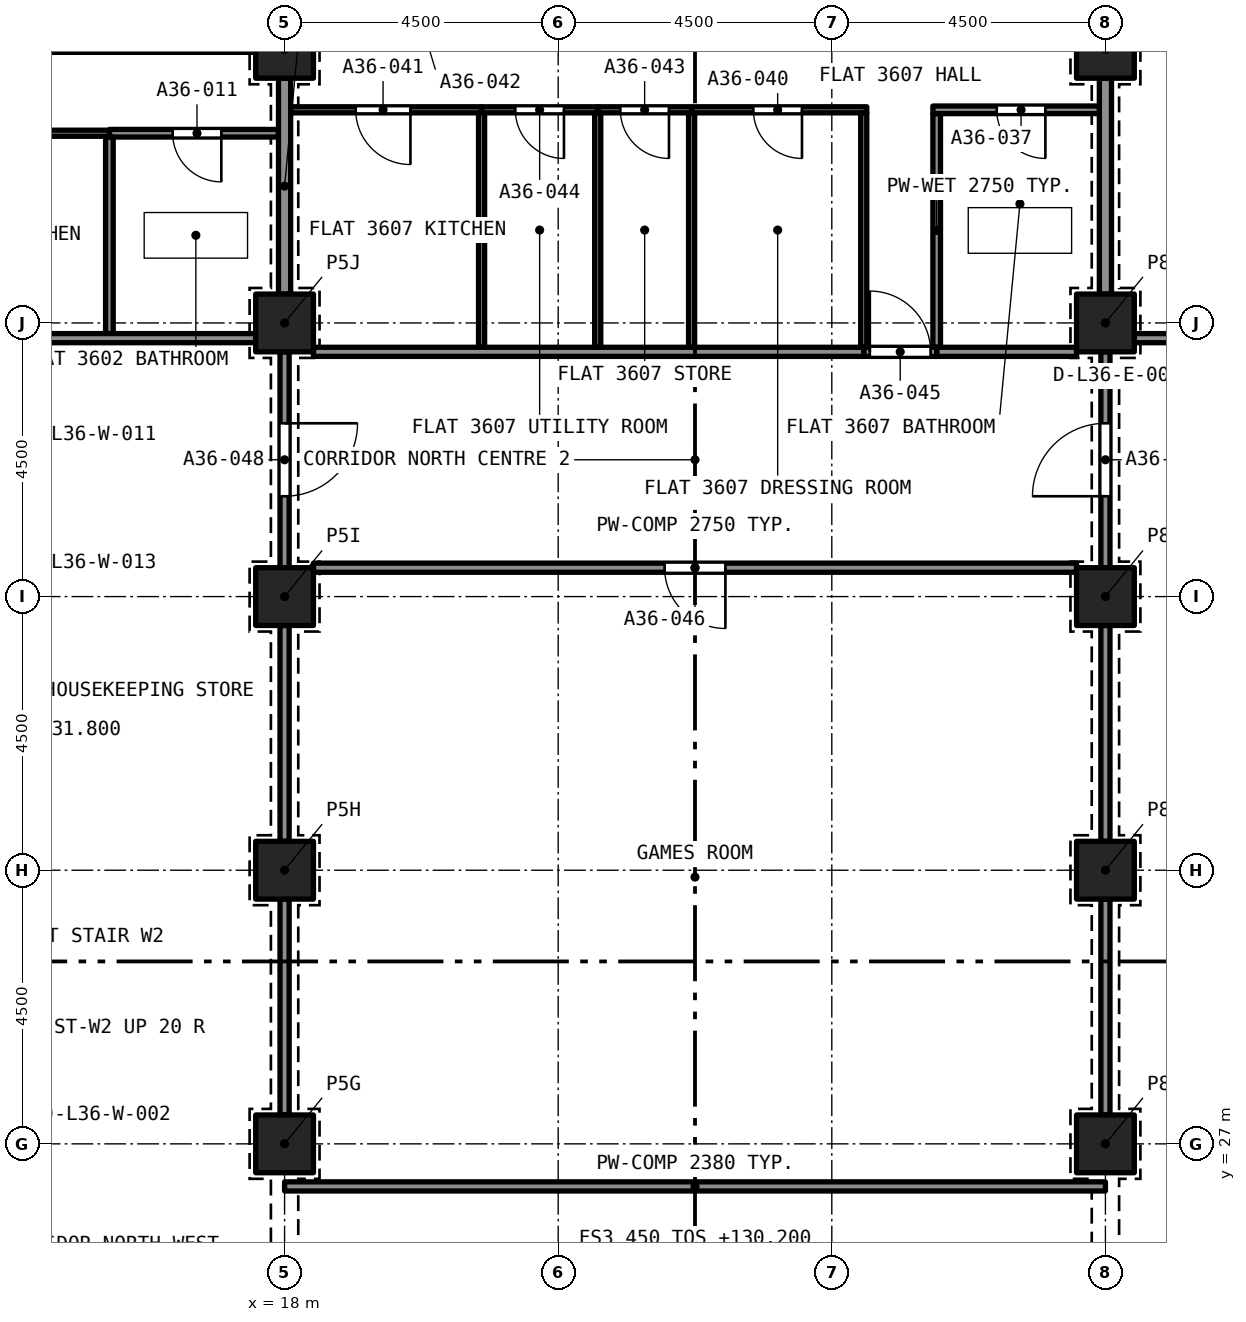
"""IFC4 building model, lengths in metres.
Left out: names, types, materials, properties, quantities, classifications, styles, units other than length and angle.
Written with IfcOpenShell. Run it as: python <this file> out.ifc"""

import sys

from ifc_helpers import new_model, si_unit, direction, frame, frame_2d, origin, origin_2d, place, context, subcontext, project, spatial, rectangle, extrude, element, fill, save


model = new_model("IFC4")
c1 = context("Model", 3, precision=1e-05, world=origin(), true_north=direction((0.0, 1.0)))
c2 = subcontext(c1, "Body", "Model", "MODEL_VIEW")
j1 = project(units=[si_unit("LENGTHUNIT", "METRE"), si_unit("PLANEANGLEUNIT", "RADIAN")], contexts=[c1])
p1 = place(None, origin())
s1 = spatial("IfcSite", under=j1, at=p1, CompositionType="ELEMENT")
p2 = place(p1, origin())
s2 = spatial("IfcBuilding", under=s1, at=p2, CompositionType="ELEMENT")
p3 = place(p2, frame((0.0, 0.0, 130.2)))
s3 = spatial("IfcBuildingStorey", under=s2, at=p3, CompositionType="ELEMENT", Elevation=130.2)
for number, where, z_axis, x_axis in (
    (1, (18.0, 27.0, 0.0), (0.0, 0.0, 1.0), (1.0, 0.0, 0.0)),
    (2, (31.5, 27.0, 0.0), (0.0, 0.0, 1.0), (1.0, 0.0, 0.0)),
    (3, (18.0, 31.5, 0.0), (0.0, 0.0, 1.0), (1.0, 0.0, 0.0)),
    (4, (31.5, 31.5, 0.0), (0.0, 0.0, 1.0), (1.0, 0.0, 0.0)),
    (5, (18.0, 36.0, 0.0), (0.0, 0.0, 1.0), (1.0, 0.0, 0.0)),
    (6, (31.5, 36.0, 0.0), (0.0, 0.0, 1.0), (1.0, 0.0, 0.0)),
    (7, (18.0, 40.5, 0.0), (0.0, 0.0, 1.0), (1.0, 0.0, 0.0)),
    (8, (31.5, 40.5, 0.0), (0.0, 0.0, 1.0), (1.0, 0.0, 0.0)),
    (9, (18.0, 45.0, 0.0), (0.0, 0.0, 1.0), (1.0, 0.0, 0.0)),
    (10, (31.5, 45.0, 0.0), (0.0, 0.0, 1.0), (1.0, 0.0, 0.0)),
):
    element("IfcColumn", number, at=place(p3, frame(where, z_axis=z_axis, x_axis=x_axis)), inside=s3, PredefinedType="COLUMN", context=c2, shape_type="SweptSolid", body=[
        extrude(rectangle(XDim=0.95, YDim=0.95, at=origin_2d()), origin(), (0.0, 0.0, 1.0), 3.2),
    ])
p4 = place(p3, frame((17.9, 43.62, 0.0), z_axis=(0.0, 0.0, 1.0), x_axis=(-1.0, 0.0, 0.0)))
e11 = element("IfcWall", 11, at=p4, inside=s3, PredefinedType="PARTITIONING", context=c2, shape_type="SweptSolid", body=[
    extrude(rectangle(XDim=2.781, YDim=0.125, at=frame_2d((1.39, 0.0))), origin(), (0.0, 0.0, 1.0), 2.9),
])
p5 = place(p4, frame((0.94, 0.0, 0.0)))
e12 = element("IfcOpeningElement", 12, at=p5, cuts=e11, PredefinedType="OPENING", context=c2, shape_type="SweptSolid", body=[
    extrude(rectangle(XDim=0.8, YDim=2.1, at=frame_2d((0.4, 1.05))), frame((0.0, 0.073, 0.0), z_axis=(0.0, -1.0, 0.0), x_axis=(1.0, 0.0, 0.0)), (0.0, 0.0, 1.0), 0.145),
])
p6 = place(p3, frame((15.119, 40.325, 0.0), z_axis=(0.0, 0.0, 1.0), x_axis=(0.0, 1.0, 0.0)))
e13 = element("IfcWall", 13, at=p6, inside=s3, PredefinedType="PARTITIONING", context=c2, shape_type="SweptSolid", body=[
    extrude(rectangle(XDim=3.233, YDim=0.125, at=frame_2d((1.616, 0.0))), origin(), (0.0, 0.0, 1.0), 2.9),
])
p7 = place(p3, frame((18.0, 40.975, 0.0), z_axis=(0.0, 0.0, 1.0), x_axis=(0.0, 1.0, 0.0)))
e14 = element("IfcWall", 14, at=p7, inside=s3, PredefinedType="PARTITIONING", context=c2, shape_type="SweptSolid", body=[
    extrude(rectangle(XDim=3.55, YDim=0.2, at=frame_2d((1.775, 0.0))), origin(), (0.0, 0.0, 1.0), 2.38),
])
p8 = place(p3, frame((13.5, 45.0, 0.0), z_axis=(0.0, 0.0, 1.0), x_axis=(1.0, 0.0, 0.0)))
e15 = element("IfcWall", 15, at=p8, inside=s3, PredefinedType="PARTITIONING", context=c2, shape_type="SweptSolid", body=[
    extrude(rectangle(XDim=4.025, YDim=0.1, at=frame_2d((2.012, 0.0))), origin(), (0.0, 0.0, 1.0), 2.9),
])
p9 = place(p8, frame((1.8, 0.0, 0.0)))
e16 = element("IfcOpeningElement", 16, at=p9, cuts=e15, PredefinedType="OPENING", context=c2, shape_type="SweptSolid", body=[
    extrude(rectangle(XDim=0.9, YDim=2.1, at=frame_2d((0.45, 1.05))), frame((0.0, 0.06, 0.0), z_axis=(0.0, -1.0, 0.0), x_axis=(1.0, 0.0, 0.0)), (0.0, 0.0, 1.0), 0.12),
])
p10 = place(p3, frame((15.119, 43.62, 0.0), z_axis=(0.0, 0.0, 1.0), x_axis=(-1.0, 0.0, 0.0)))
e17 = element("IfcWall", 17, at=p10, inside=s3, PredefinedType="PARTITIONING", context=c2, shape_type="SweptSolid", body=[
    extrude(rectangle(XDim=4.219, YDim=0.1, at=frame_2d((2.11, 0.0))), origin(), (0.0, 0.0, 1.0), 2.9),
])
p11 = place(p10, frame((1.635, 0.0, 0.0)))
e18 = element("IfcOpeningElement", 18, at=p11, cuts=e17, PredefinedType="OPENING", context=c2, shape_type="SweptSolid", body=[
    extrude(rectangle(XDim=0.9, YDim=2.1, at=frame_2d((0.45, 1.05))), frame((0.0, 0.06, 0.0), z_axis=(0.0, -1.0, 0.0), x_axis=(1.0, 0.0, 0.0)), (0.0, 0.0, 1.0), 0.12),
])
p12 = place(p3, frame((13.25, 40.25, 0.0), z_axis=(0.0, 0.0, 1.0), x_axis=(1.0, 0.0, 0.0)))
e19 = element("IfcWall", 19, at=p12, inside=s3, PredefinedType="PARTITIONING", context=c2, shape_type="SweptSolid", body=[
    extrude(rectangle(XDim=4.275, YDim=0.15, at=frame_2d((2.137, 0.0))), origin(), (0.0, 0.0, 1.0), 2.9),
])
p13 = place(p3, frame((31.5, 40.975, 0.0), z_axis=(0.0, 0.0, 1.0), x_axis=(0.0, 1.0, 0.0)))
e20 = element("IfcWall", 20, at=p13, inside=s3, PredefinedType="PARTITIONING", context=c2, shape_type="SweptSolid", body=[
    extrude(rectangle(XDim=3.55, YDim=0.2, at=frame_2d((1.775, 0.0))), origin(), (0.0, 0.0, 1.0), 2.38),
])
p14 = place(p3, frame((31.975, 40.25, 0.0), z_axis=(0.0, 0.0, 1.0), x_axis=(1.0, 0.0, 0.0)))
e21 = element("IfcWall", 21, at=p14, inside=s3, PredefinedType="PARTITIONING", context=c2, shape_type="SweptSolid", body=[
    extrude(rectangle(XDim=2.375, YDim=0.15, at=frame_2d((1.188, 0.0))), origin(), (0.0, 0.0, 1.0), 2.9),
])
p15 = place(p14, frame((1.245, 0.0, 0.0)))
e22 = element("IfcOpeningElement", 22, at=p15, cuts=e21, PredefinedType="OPENING", context=c2, shape_type="SweptSolid", body=[
    extrude(rectangle(XDim=1.0, YDim=2.1, at=frame_2d((0.5, 1.05))), frame((0.0, 0.085, 0.0), z_axis=(0.0, -1.0, 0.0), x_axis=(1.0, 0.0, 0.0)), (0.0, 0.0, 1.0), 0.17),
])
p16 = place(p3, frame((28.725, 40.1, 0.0), z_axis=(0.0, 0.0, 1.0), x_axis=(0.0, 1.0, 0.0)))
e23 = element("IfcWall", 23, at=p16, inside=s3, PredefinedType="PARTITIONING", context=c2, shape_type="SweptSolid", body=[
    extrude(rectangle(XDim=3.842, YDim=0.125, at=frame_2d((1.921, 0.0))), origin(), (0.0, 0.0, 1.0), 2.75),
])
p17 = place(p3, frame((31.4, 44.005, 0.0), z_axis=(0.0, 0.0, 1.0), x_axis=(-1.0, 0.0, 0.0)))
e24 = element("IfcWall", 24, at=p17, inside=s3, PredefinedType="PARTITIONING", context=c2, shape_type="SweptSolid", body=[
    extrude(rectangle(XDim=2.737, YDim=0.125, at=frame_2d((1.369, 0.0))), origin(), (0.0, 0.0, 1.0), 2.75),
])
p18 = place(p17, frame((0.887, 0.0, 0.0)))
e25 = element("IfcOpeningElement", 25, at=p18, cuts=e24, PredefinedType="OPENING", context=c2, shape_type="SweptSolid", body=[
    extrude(rectangle(XDim=0.8, YDim=2.1, at=frame_2d((0.4, 1.05))), frame((0.0, 0.073, 0.0), z_axis=(0.0, -1.0, 0.0), x_axis=(1.0, 0.0, 0.0)), (0.0, 0.0, 1.0), 0.145),
])
p19 = place(p3, frame((28.725, 40.025, 0.0), z_axis=(0.0, 0.0, 1.0), x_axis=(1.0, 0.0, 0.0)))
e26 = element("IfcWall", 26, at=p19, inside=s3, PredefinedType="PARTITIONING", context=c2, shape_type="SweptSolid", body=[
    extrude(rectangle(XDim=2.3, YDim=0.15, at=frame_2d((1.15, 0.0))), origin(), (0.0, 0.0, 1.0), 2.75),
])
p20 = place(p3, frame((27.575, 44.005, 0.0), z_axis=(0.0, 0.0, 1.0), x_axis=(-1.0, 0.0, 0.0)))
e27 = element("IfcWall", 27, at=p20, inside=s3, PredefinedType="PARTITIONING", context=c2, shape_type="SweptSolid", body=[
    extrude(rectangle(XDim=2.881, YDim=0.1, at=frame_2d((1.44, 0.0))), origin(), (0.0, 0.0, 1.0), 2.75),
])
p21 = place(p20, frame((1.066, 0.0, 0.0)))
e28 = element("IfcOpeningElement", 28, at=p21, cuts=e27, PredefinedType="OPENING", context=c2, shape_type="SweptSolid", body=[
    extrude(rectangle(XDim=0.8, YDim=2.1, at=frame_2d((0.4, 1.05))), frame((0.0, 0.06, 0.0), z_axis=(0.0, -1.0, 0.0), x_axis=(1.0, 0.0, 0.0)), (0.0, 0.0, 1.0), 0.12),
])
for number, where, z_axis, x_axis in (
    (29, (27.525, 40.1, 0.0), (0.0, 0.0, 1.0), (0.0, 1.0, 0.0)),
    (30, (24.694, 40.1, 0.0), (0.0, 0.0, 1.0), (0.0, 1.0, 0.0)),
):
    element("IfcWall", number, at=place(p3, frame(where, z_axis=z_axis, x_axis=x_axis)), inside=s3, PredefinedType="PARTITIONING", context=c2, shape_type="SweptSolid", body=[
        extrude(rectangle(XDim=3.855, YDim=0.1, at=frame_2d((1.927, 0.0))), origin(), (0.0, 0.0, 1.0), 2.75),
    ])
p22 = place(p3, frame((21.24, 44.005, 0.0), z_axis=(0.0, 0.0, 1.0), x_axis=(-1.0, 0.0, 0.0)))
e31 = element("IfcWall", 31, at=p22, inside=s3, PredefinedType="PARTITIONING", context=c2, shape_type="SweptSolid", body=[
    extrude(rectangle(XDim=3.14, YDim=0.1, at=frame_2d((1.57, 0.0))), origin(), (0.0, 0.0, 1.0), 2.75),
])
p23 = place(p22, frame((1.17, 0.0, 0.0)))
e32 = element("IfcOpeningElement", 32, at=p23, cuts=e31, PredefinedType="OPENING", context=c2, shape_type="SweptSolid", body=[
    extrude(rectangle(XDim=0.9, YDim=2.1, at=frame_2d((0.45, 1.05))), frame((0.0, 0.06, 0.0), z_axis=(0.0, -1.0, 0.0), x_axis=(1.0, 0.0, 0.0)), (0.0, 0.0, 1.0), 0.12),
])
p24 = place(p3, frame((24.694, 44.005, 0.0), z_axis=(0.0, 0.0, 1.0), x_axis=(-1.0, 0.0, 0.0)))
e33 = element("IfcWall", 33, at=p24, inside=s3, PredefinedType="PARTITIONING", context=c2, shape_type="SweptSolid", body=[
    extrude(rectangle(XDim=1.544, YDim=0.1, at=frame_2d((0.772, 0.0))), origin(), (0.0, 0.0, 1.0), 2.75),
])
p25 = place(p24, frame((0.372, 0.0, 0.0)))
e34 = element("IfcOpeningElement", 34, at=p25, cuts=e33, PredefinedType="OPENING", context=c2, shape_type="SweptSolid", body=[
    extrude(rectangle(XDim=0.8, YDim=2.1, at=frame_2d((0.4, 1.05))), frame((0.0, 0.06, 0.0), z_axis=(0.0, -1.0, 0.0), x_axis=(1.0, 0.0, 0.0)), (0.0, 0.0, 1.0), 0.12),
])
p26 = place(p3, frame((23.15, 44.005, 0.0), z_axis=(0.0, 0.0, 1.0), x_axis=(-1.0, 0.0, 0.0)))
e35 = element("IfcWall", 35, at=p26, inside=s3, PredefinedType="PARTITIONING", context=c2, shape_type="SweptSolid", body=[
    extrude(rectangle(XDim=1.91, YDim=0.1, at=frame_2d((0.955, 0.0))), origin(), (0.0, 0.0, 1.0), 2.75),
])
p27 = place(p26, frame((0.555, 0.0, 0.0)))
e36 = element("IfcOpeningElement", 36, at=p27, cuts=e35, PredefinedType="OPENING", context=c2, shape_type="SweptSolid", body=[
    extrude(rectangle(XDim=0.8, YDim=2.1, at=frame_2d((0.4, 1.05))), frame((0.0, 0.06, 0.0), z_axis=(0.0, -1.0, 0.0), x_axis=(1.0, 0.0, 0.0)), (0.0, 0.0, 1.0), 0.12),
])
p28 = place(p3, frame((27.525, 40.025, 0.0), z_axis=(0.0, 0.0, 1.0), x_axis=(1.0, 0.0, 0.0)))
e37 = element("IfcWall", 37, at=p28, inside=s3, PredefinedType="PARTITIONING", context=c2, shape_type="SweptSolid", body=[
    extrude(rectangle(XDim=1.2, YDim=0.15, at=frame_2d((0.6, 0.0))), origin(), (0.0, 0.0, 1.0), 2.75),
])
p29 = place(p28, frame((0.1, 0.0, 0.0)))
e38 = element("IfcOpeningElement", 38, at=p29, cuts=e37, PredefinedType="OPENING", context=c2, shape_type="SweptSolid", body=[
    extrude(rectangle(XDim=1.0, YDim=2.1, at=frame_2d((0.5, 1.05))), frame((0.0, 0.085, 0.0), z_axis=(0.0, -1.0, 0.0), x_axis=(1.0, 0.0, 0.0)), (0.0, 0.0, 1.0), 0.17),
])
p30 = place(p3, frame((21.24, 40.1, 0.0), z_axis=(0.0, 0.0, 1.0), x_axis=(0.0, 1.0, 0.0)))
e39 = element("IfcWall", 39, at=p30, inside=s3, PredefinedType="PARTITIONING", context=c2, shape_type="SweptSolid", body=[
    extrude(rectangle(XDim=3.855, YDim=0.1, at=frame_2d((1.927, 0.0))), origin(), (0.0, 0.0, 1.0), 2.75),
])
p31 = place(p3, frame((18.475, 40.025, 0.0), z_axis=(0.0, 0.0, 1.0), x_axis=(1.0, 0.0, 0.0)))
e40 = element("IfcWall", 40, at=p31, inside=s3, PredefinedType="PARTITIONING", context=c2, shape_type="SweptSolid", body=[
    extrude(rectangle(XDim=9.05, YDim=0.15, at=frame_2d((4.525, 0.0))), origin(), (0.0, 0.0, 1.0), 2.75),
])
p32 = place(p3, frame((23.15, 40.1, 0.0), z_axis=(0.0, 0.0, 1.0), x_axis=(0.0, 1.0, 0.0)))
e41 = element("IfcWall", 41, at=p32, inside=s3, PredefinedType="PARTITIONING", context=c2, shape_type="SweptSolid", body=[
    extrude(rectangle(XDim=3.855, YDim=0.1, at=frame_2d((1.927, 0.0))), origin(), (0.0, 0.0, 1.0), 2.75),
])
p33 = place(p3, frame((31.025, 36.475, 0.0), z_axis=(0.0, 0.0, 1.0), x_axis=(-1.0, 0.0, 0.0)))
e42 = element("IfcWall", 42, at=p33, inside=s3, PredefinedType="PARTITIONING", context=c2, shape_type="SweptSolid", body=[
    extrude(rectangle(XDim=12.55, YDim=0.15, at=frame_2d((6.275, 0.0))), origin(), (0.0, 0.0, 1.0), 2.75),
])
p34 = place(p33, frame((5.775, 0.0, 0.0)))
e43 = element("IfcOpeningElement", 43, at=p34, cuts=e42, PredefinedType="OPENING", context=c2, shape_type="SweptSolid", body=[
    extrude(rectangle(XDim=1.0, YDim=2.1, at=frame_2d((0.5, 1.05))), frame((0.0, 0.085, 0.0), z_axis=(0.0, -1.0, 0.0), x_axis=(1.0, 0.0, 0.0)), (0.0, 0.0, 1.0), 0.17),
])
p35 = place(p3, frame((31.5, 36.475, 0.0), z_axis=(0.0, 0.0, 1.0), x_axis=(0.0, 1.0, 0.0)))
e44 = element("IfcWall", 44, at=p35, inside=s3, PredefinedType="PARTITIONING", context=c2, shape_type="SweptSolid", body=[
    extrude(rectangle(XDim=3.55, YDim=0.15, at=frame_2d((1.775, 0.0))), origin(), (0.0, 0.0, 1.0), 2.38),
])
p36 = place(p35, frame((1.175, 0.0, 0.0)))
e45 = element("IfcOpeningElement", 45, at=p36, cuts=e44, PredefinedType="OPENING", context=c2, shape_type="SweptSolid", body=[
    extrude(rectangle(XDim=1.2, YDim=2.1, at=frame_2d((0.6, 1.05))), frame((0.0, 0.085, 0.0), z_axis=(0.0, -1.0, 0.0), x_axis=(1.0, 0.0, 0.0)), (0.0, 0.0, 1.0), 0.17),
])
p37 = place(p3, frame((18.0, 40.025, 0.0), z_axis=(0.0, 0.0, 1.0), x_axis=(0.0, -1.0, 0.0)))
e46 = element("IfcWall", 46, at=p37, inside=s3, PredefinedType="PARTITIONING", context=c2, shape_type="SweptSolid", body=[
    extrude(rectangle(XDim=3.55, YDim=0.15, at=frame_2d((1.775, 0.0))), origin(), (0.0, 0.0, 1.0), 2.38),
])
p38 = place(p37, frame((1.175, 0.0, 0.0)))
e47 = element("IfcOpeningElement", 47, at=p38, cuts=e46, PredefinedType="OPENING", context=c2, shape_type="SweptSolid", body=[
    extrude(rectangle(XDim=1.2, YDim=2.1, at=frame_2d((0.6, 1.05))), frame((0.0, 0.085, 0.0), z_axis=(0.0, -1.0, 0.0), x_axis=(1.0, 0.0, 0.0)), (0.0, 0.0, 1.0), 0.17),
])
for number, where, z_axis, x_axis in (
    (48, (31.5, 31.975, 0.0), (0.0, 0.0, 1.0), (0.0, 1.0, 0.0)),
    (49, (31.5, 27.475, 0.0), (0.0, 0.0, 1.0), (0.0, 1.0, 0.0)),
    (50, (18.0, 27.475, 0.0), (0.0, 0.0, 1.0), (0.0, 1.0, 0.0)),
    (51, (18.0, 31.975, 0.0), (0.0, 0.0, 1.0), (0.0, 1.0, 0.0)),
):
    element("IfcWall", number, at=place(p3, frame(where, z_axis=z_axis, x_axis=x_axis)), inside=s3, PredefinedType="PARTITIONING", context=c2, shape_type="SweptSolid", body=[
        extrude(rectangle(XDim=3.55, YDim=0.15, at=frame_2d((1.775, 0.0))), origin(), (0.0, 0.0, 1.0), 2.38),
    ])
p39 = place(p3, frame((18.0, 26.3, 0.0), z_axis=(0.0, 0.0, 1.0), x_axis=(1.0, 0.0, 0.0)))
e52 = element("IfcWall", 52, at=p39, inside=s3, PredefinedType="PARTITIONING", context=c2, shape_type="SweptSolid", body=[
    extrude(rectangle(XDim=13.5, YDim=0.15, at=frame_2d((6.75, 0.0))), origin(), (0.0, 0.0, 1.0), 2.38),
])
p40 = place(p5, origin())
e53 = element("IfcDoor", 53, at=p40, inside=s3, OperationType="SINGLE_SWING_LEFT", PredefinedType="DOOR", context=c2, shape_type="SweptSolid", body=[
    extrude(rectangle(XDim=0.8, YDim=2.1, at=frame_2d((0.4, 1.05))), frame((0.0, 0.025, 0.0), z_axis=(0.0, -1.0, 0.0), x_axis=(1.0, 0.0, 0.0)), (0.0, 0.0, 1.0), 0.05),
])
fill(e12, e53)
p41 = place(p18, origin())
e54 = element("IfcDoor", 54, at=p41, inside=s3, OperationType="SINGLE_SWING_LEFT", PredefinedType="DOOR", context=c2, shape_type="SweptSolid", body=[
    extrude(rectangle(XDim=0.8, YDim=2.1, at=frame_2d((0.4, 1.05))), frame((0.0, 0.025, 0.0), z_axis=(0.0, -1.0, 0.0), x_axis=(1.0, 0.0, 0.0)), (0.0, 0.0, 1.0), 0.05),
])
fill(e25, e54)
p42 = place(p21, origin())
e55 = element("IfcDoor", 55, at=p42, inside=s3, OperationType="SINGLE_SWING_RIGHT", PredefinedType="DOOR", context=c2, shape_type="SweptSolid", body=[
    extrude(rectangle(XDim=0.8, YDim=2.1, at=frame_2d((0.4, 1.05))), frame((0.0, 0.025, 0.0), z_axis=(0.0, -1.0, 0.0), x_axis=(1.0, 0.0, 0.0)), (0.0, 0.0, 1.0), 0.05),
])
fill(e28, e55)
p43 = place(p23, origin())
e56 = element("IfcDoor", 56, at=p43, inside=s3, OperationType="SINGLE_SWING_RIGHT", PredefinedType="DOOR", context=c2, shape_type="SweptSolid", body=[
    extrude(rectangle(XDim=0.9, YDim=2.1, at=frame_2d((0.45, 1.05))), frame((0.0, 0.025, 0.0), z_axis=(0.0, -1.0, 0.0), x_axis=(1.0, 0.0, 0.0)), (0.0, 0.0, 1.0), 0.05),
])
fill(e32, e56)
p44 = place(p25, origin())
e57 = element("IfcDoor", 57, at=p44, inside=s3, OperationType="SINGLE_SWING_LEFT", PredefinedType="DOOR", context=c2, shape_type="SweptSolid", body=[
    extrude(rectangle(XDim=0.8, YDim=2.1, at=frame_2d((0.4, 1.05))), frame((0.0, 0.025, 0.0), z_axis=(0.0, -1.0, 0.0), x_axis=(1.0, 0.0, 0.0)), (0.0, 0.0, 1.0), 0.05),
])
fill(e34, e57)
p45 = place(p27, origin())
e58 = element("IfcDoor", 58, at=p45, inside=s3, OperationType="SINGLE_SWING_LEFT", PredefinedType="DOOR", context=c2, shape_type="SweptSolid", body=[
    extrude(rectangle(XDim=0.8, YDim=2.1, at=frame_2d((0.4, 1.05))), frame((0.0, 0.025, 0.0), z_axis=(0.0, -1.0, 0.0), x_axis=(1.0, 0.0, 0.0)), (0.0, 0.0, 1.0), 0.05),
])
fill(e36, e58)
p46 = place(p29, origin())
e59 = element("IfcDoor", 59, at=p46, inside=s3, OperationType="SINGLE_SWING_RIGHT", PredefinedType="DOOR", context=c2, shape_type="SweptSolid", body=[
    extrude(rectangle(XDim=1.0, YDim=2.1, at=frame_2d((0.5, 1.05))), frame((0.0, 0.025, 0.0), z_axis=(0.0, -1.0, 0.0), x_axis=(1.0, 0.0, 0.0)), (0.0, 0.0, 1.0), 0.05),
])
fill(e38, e59)
p47 = place(p34, origin())
e60 = element("IfcDoor", 60, at=p47, inside=s3, OperationType="SINGLE_SWING_RIGHT", PredefinedType="DOOR", context=c2, shape_type="SweptSolid", body=[
    extrude(rectangle(XDim=1.0, YDim=2.1, at=frame_2d((0.5, 1.05))), frame((0.0, 0.025, 0.0), z_axis=(0.0, -1.0, 0.0), x_axis=(1.0, 0.0, 0.0)), (0.0, 0.0, 1.0), 0.05),
])
fill(e43, e60)
p48 = place(p36, origin())
e61 = element("IfcDoor", 61, at=p48, inside=s3, OperationType="SINGLE_SWING_LEFT", PredefinedType="DOOR", context=c2, shape_type="SweptSolid", body=[
    extrude(rectangle(XDim=1.2, YDim=2.1, at=frame_2d((0.6, 1.05))), frame((0.0, 0.025, 0.0), z_axis=(0.0, -1.0, 0.0), x_axis=(1.0, 0.0, 0.0)), (0.0, 0.0, 1.0), 0.05),
])
fill(e45, e61)
p49 = place(p38, origin())
e62 = element("IfcDoor", 62, at=p49, inside=s3, OperationType="SINGLE_SWING_LEFT", PredefinedType="DOOR", context=c2, shape_type="SweptSolid", body=[
    extrude(rectangle(XDim=1.2, YDim=2.1, at=frame_2d((0.6, 1.05))), frame((0.0, 0.025, 0.0), z_axis=(0.0, -1.0, 0.0), x_axis=(1.0, 0.0, 0.0)), (0.0, 0.0, 1.0), 0.05),
])
fill(e47, e62)
save(model, sys.argv[1])
